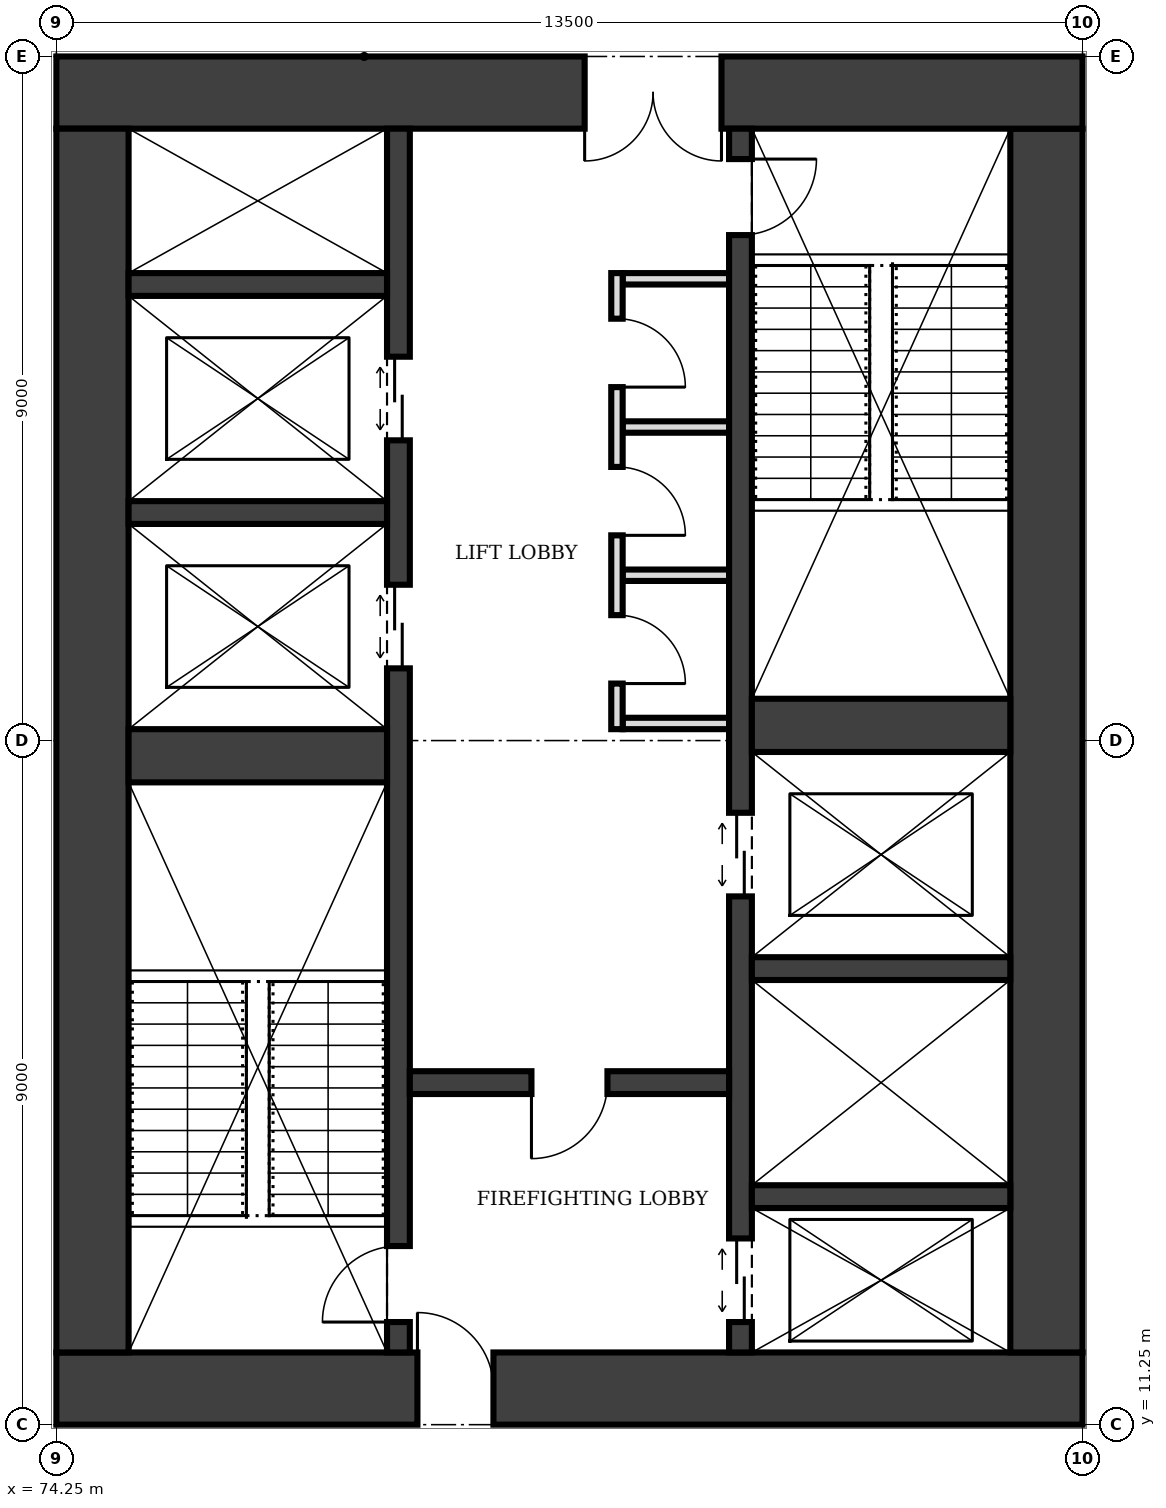
"""IFC4 building model, lengths in metres.
Left out: names, types, materials, properties, quantities, classifications, styles, units other than length and angle.
Written with IfcOpenShell. Run it as: python <this file> out.ifc"""

import sys

from ifc_helpers import new_model, si_unit, direction, frame, frame_2d, origin, place, context, subcontext, project, spatial, rectangle, extrude, element, fill, save


model = new_model("IFC4")
c1 = context("Model", 3, precision=1e-05, world=origin(), true_north=direction((0.0, 1.0)))
c2 = subcontext(c1, "Body", "Model", "MODEL_VIEW")
j1 = project(units=[si_unit("LENGTHUNIT", "METRE"), si_unit("PLANEANGLEUNIT", "RADIAN")], contexts=[c1])
p1 = place(None, origin())
s1 = spatial("IfcSite", under=j1, at=p1, CompositionType="ELEMENT")
p2 = place(p1, origin())
s2 = spatial("IfcBuilding", under=s1, at=p2, CompositionType="ELEMENT")
p3 = place(p2, frame((0.0, 0.0, 49.0)))
s3 = spatial("IfcBuildingStorey", under=s2, at=p3, CompositionType="ELEMENT", Elevation=49.0)
p4 = place(p3, frame((74.25, 11.725, 0.0), z_axis=(0.0, 0.0, 1.0), x_axis=(1.0, 0.0, 0.0)))
e1 = element("IfcWall", 1, at=p4, inside=s3, PredefinedType="SHEAR", context=c2, shape_type="SweptSolid", body=[
    extrude(rectangle(XDim=13.5, YDim=0.95, at=frame_2d((6.75, 0.0))), origin(), (0.0, 0.0, 1.0), 4.0),
])
p5 = place(p4, frame((4.75, 0.0, 0.0)))
e2 = element("IfcOpeningElement", 2, at=p5, cuts=e1, PredefinedType="OPENING", context=c2, shape_type="SweptSolid", body=[
    extrude(rectangle(XDim=1.0, YDim=2.1, at=frame_2d((0.5, 1.05))), frame((0.0, 0.485, 0.0), z_axis=(0.0, -1.0, 0.0), x_axis=(1.0, 0.0, 0.0)), (0.0, 0.0, 1.0), 0.97),
])
p6 = place(p3, frame((87.275, 12.2, 0.0), z_axis=(0.0, 0.0, 1.0), x_axis=(0.0, 1.0, 0.0)))
e3 = element("IfcWall", 3, at=p6, inside=s3, PredefinedType="SHEAR", context=c2, shape_type="SweptSolid", body=[
    extrude(rectangle(XDim=16.1, YDim=0.95, at=frame_2d((8.05, 0.0))), origin(), (0.0, 0.0, 1.0), 4.0),
])
p7 = place(p3, frame((87.75, 28.775, 0.0), z_axis=(0.0, 0.0, 1.0), x_axis=(-1.0, 0.0, 0.0)))
e4 = element("IfcWall", 4, at=p7, inside=s3, PredefinedType="SHEAR", context=c2, shape_type="SweptSolid", body=[
    extrude(rectangle(XDim=13.5, YDim=0.95, at=frame_2d((6.75, 0.0))), origin(), (0.0, 0.0, 1.0), 4.0),
])
p8 = place(p7, frame((4.75, 0.0, 0.0)))
e5 = element("IfcOpeningElement", 5, at=p8, cuts=e4, PredefinedType="OPENING", context=c2, shape_type="SweptSolid", body=[
    extrude(rectangle(XDim=1.8, YDim=2.1, at=frame_2d((0.9, 1.05))), frame((0.0, 0.485, 0.0), z_axis=(0.0, -1.0, 0.0), x_axis=(1.0, 0.0, 0.0)), (0.0, 0.0, 1.0), 0.97),
])
p9 = place(p3, frame((74.725, 28.3, 0.0), z_axis=(0.0, 0.0, 1.0), x_axis=(0.0, -1.0, 0.0)))
e6 = element("IfcWall", 6, at=p9, inside=s3, PredefinedType="SHEAR", context=c2, shape_type="SweptSolid", body=[
    extrude(rectangle(XDim=16.1, YDim=0.95, at=frame_2d((8.05, 0.0))), origin(), (0.0, 0.0, 1.0), 4.0),
])
p10 = place(p3, frame((78.75, 12.2, 0.0), z_axis=(0.0, 0.0, 1.0), x_axis=(0.0, 1.0, 0.0)))
e7 = element("IfcWall", 7, at=p10, inside=s3, PredefinedType="SHEAR", context=c2, shape_type="SweptSolid", body=[
    extrude(rectangle(XDim=16.1, YDim=0.3, at=frame_2d((8.05, 0.0))), origin(), (0.0, 0.0, 1.0), 4.0),
])
p11 = place(p10, frame((0.4, 0.0, 0.0)))
e8 = element("IfcOpeningElement", 8, at=p11, cuts=e7, PredefinedType="OPENING", context=c2, shape_type="SweptSolid", body=[
    extrude(rectangle(XDim=1.0, YDim=2.1, at=frame_2d((0.5, 1.05))), frame((0.0, 0.16, 0.0), z_axis=(0.0, -1.0, 0.0), x_axis=(1.0, 0.0, 0.0)), (0.0, 0.0, 1.0), 0.32),
])
p12 = place(p10, frame((9.0, 0.0, 0.0)))
e9 = element("IfcOpeningElement", 9, at=p12, cuts=e7, PredefinedType="OPENING", context=c2, shape_type="SweptSolid", body=[
    extrude(rectangle(XDim=1.1, YDim=2.1, at=frame_2d((0.55, 1.05))), frame((0.0, 0.16, 0.0), z_axis=(0.0, -1.0, 0.0), x_axis=(1.0, 0.0, 0.0)), (0.0, 0.0, 1.0), 0.32),
])
p13 = place(p10, frame((12.0, 0.0, 0.0)))
e10 = element("IfcOpeningElement", 10, at=p13, cuts=e7, PredefinedType="OPENING", context=c2, shape_type="SweptSolid", body=[
    extrude(rectangle(XDim=1.1, YDim=2.1, at=frame_2d((0.55, 1.05))), frame((0.0, 0.16, 0.0), z_axis=(0.0, -1.0, 0.0), x_axis=(1.0, 0.0, 0.0)), (0.0, 0.0, 1.0), 0.32),
])
p14 = place(p3, frame((83.25, 12.2, 0.0), z_axis=(0.0, 0.0, 1.0), x_axis=(0.0, 1.0, 0.0)))
e11 = element("IfcWall", 11, at=p14, inside=s3, PredefinedType="SHEAR", context=c2, shape_type="SweptSolid", body=[
    extrude(rectangle(XDim=16.1, YDim=0.3, at=frame_2d((8.05, 0.0))), origin(), (0.0, 0.0, 1.0), 4.0),
])
p15 = place(p14, frame((14.7, 0.0, 0.0)))
e12 = element("IfcOpeningElement", 12, at=p15, cuts=e11, PredefinedType="OPENING", context=c2, shape_type="SweptSolid", body=[
    extrude(rectangle(XDim=1.0, YDim=2.1, at=frame_2d((0.5, 1.05))), frame((0.0, 0.16, 0.0), z_axis=(0.0, -1.0, 0.0), x_axis=(1.0, 0.0, 0.0)), (0.0, 0.0, 1.0), 0.32),
])
p16 = place(p14, frame((0.4, 0.0, 0.0)))
e13 = element("IfcOpeningElement", 13, at=p16, cuts=e11, PredefinedType="OPENING", context=c2, shape_type="SweptSolid", body=[
    extrude(rectangle(XDim=1.1, YDim=2.1, at=frame_2d((0.55, 1.05))), frame((0.0, 0.16, 0.0), z_axis=(0.0, -1.0, 0.0), x_axis=(1.0, 0.0, 0.0)), (0.0, 0.0, 1.0), 0.32),
])
p17 = place(p14, frame((6.0, 0.0, 0.0)))
e14 = element("IfcOpeningElement", 14, at=p17, cuts=e11, PredefinedType="OPENING", context=c2, shape_type="SweptSolid", body=[
    extrude(rectangle(XDim=1.1, YDim=2.1, at=frame_2d((0.55, 1.05))), frame((0.0, 0.16, 0.0), z_axis=(0.0, -1.0, 0.0), x_axis=(1.0, 0.0, 0.0)), (0.0, 0.0, 1.0), 0.32),
])
p18 = place(p3, frame((75.2, 20.05, 0.0), z_axis=(0.0, 0.0, 1.0), x_axis=(1.0, 0.0, 0.0)))
e15 = element("IfcWall", 15, at=p18, inside=s3, PredefinedType="SHEAR", context=c2, shape_type="SweptSolid", body=[
    extrude(rectangle(XDim=3.4, YDim=0.7, at=frame_2d((1.7, 0.0))), origin(), (0.0, 0.0, 1.0), 4.0),
])
p19 = place(p3, frame((78.9, 15.75, 0.0), z_axis=(0.0, 0.0, 1.0), x_axis=(1.0, 0.0, 0.0)))
e16 = element("IfcWall", 16, at=p19, inside=s3, PredefinedType="SHEAR", context=c2, shape_type="SweptSolid", body=[
    extrude(rectangle(XDim=4.2, YDim=0.3, at=frame_2d((2.1, 0.0))), origin(), (0.0, 0.0, 1.0), 4.0),
])
p20 = place(p19, frame((1.6, 0.0, 0.0)))
e17 = element("IfcOpeningElement", 17, at=p20, cuts=e16, PredefinedType="OPENING", context=c2, shape_type="SweptSolid", body=[
    extrude(rectangle(XDim=1.0, YDim=2.1, at=frame_2d((0.5, 1.05))), frame((0.0, 0.16, 0.0), z_axis=(0.0, -1.0, 0.0), x_axis=(1.0, 0.0, 0.0)), (0.0, 0.0, 1.0), 0.32),
])
for number, where, z_axis, x_axis in (
    (18, (83.4, 14.25, 0.0), (0.0, 0.0, 1.0), (1.0, 0.0, 0.0)),
    (19, (83.4, 17.25, 0.0), (0.0, 0.0, 1.0), (1.0, 0.0, 0.0)),
):
    element("IfcWall", number, at=place(p3, frame(where, z_axis=z_axis, x_axis=x_axis)), inside=s3, PredefinedType="SHEAR", context=c2, shape_type="SweptSolid", body=[
        extrude(rectangle(XDim=3.4, YDim=0.3, at=frame_2d((1.7, 0.0))), origin(), (0.0, 0.0, 1.0), 4.0),
    ])
p21 = place(p3, frame((83.4, 20.45, 0.0), z_axis=(0.0, 0.0, 1.0), x_axis=(1.0, 0.0, 0.0)))
e20 = element("IfcWall", 20, at=p21, inside=s3, PredefinedType="SHEAR", context=c2, shape_type="SweptSolid", body=[
    extrude(rectangle(XDim=3.4, YDim=0.7, at=frame_2d((1.7, 0.0))), origin(), (0.0, 0.0, 1.0), 4.0),
])
for number, where, z_axis, x_axis in (
    (21, (75.2, 23.25, 0.0), (0.0, 0.0, 1.0), (1.0, 0.0, 0.0)),
    (22, (75.2, 26.25, 0.0), (0.0, 0.0, 1.0), (1.0, 0.0, 0.0)),
):
    element("IfcWall", number, at=place(p3, frame(where, z_axis=z_axis, x_axis=x_axis)), inside=s3, PredefinedType="SHEAR", context=c2, shape_type="SweptSolid", body=[
        extrude(rectangle(XDim=3.4, YDim=0.3, at=frame_2d((1.7, 0.0))), origin(), (0.0, 0.0, 1.0), 4.0),
    ])
p22 = place(p3, frame((81.625, 20.4, 0.0), z_axis=(0.0, 0.0, 1.0), x_axis=(0.0, 1.0, 0.0)))
e23 = element("IfcWall", 23, at=p22, inside=s3, PredefinedType="PARTITIONING", context=c2, shape_type="SweptSolid", body=[
    extrude(rectangle(XDim=6.0, YDim=0.15, at=frame_2d((3.0, 0.0))), origin(), (0.0, 0.0, 1.0), 3.75),
])
p23 = place(p22, frame((0.6, 0.0, 0.0)))
e24 = element("IfcOpeningElement", 24, at=p23, cuts=e23, PredefinedType="OPENING", context=c2, shape_type="SweptSolid", body=[
    extrude(rectangle(XDim=0.9, YDim=2.1, at=frame_2d((0.45, 1.05))), frame((0.0, 0.085, 0.0), z_axis=(0.0, -1.0, 0.0), x_axis=(1.0, 0.0, 0.0)), (0.0, 0.0, 1.0), 0.17),
])
p24 = place(p22, frame((2.55, 0.0, 0.0)))
e25 = element("IfcOpeningElement", 25, at=p24, cuts=e23, PredefinedType="OPENING", context=c2, shape_type="SweptSolid", body=[
    extrude(rectangle(XDim=0.9, YDim=2.1, at=frame_2d((0.45, 1.05))), frame((0.0, 0.085, 0.0), z_axis=(0.0, -1.0, 0.0), x_axis=(1.0, 0.0, 0.0)), (0.0, 0.0, 1.0), 0.17),
])
p25 = place(p22, frame((4.5, 0.0, 0.0)))
e26 = element("IfcOpeningElement", 26, at=p25, cuts=e23, PredefinedType="OPENING", context=c2, shape_type="SweptSolid", body=[
    extrude(rectangle(XDim=0.9, YDim=2.1, at=frame_2d((0.45, 1.05))), frame((0.0, 0.085, 0.0), z_axis=(0.0, -1.0, 0.0), x_axis=(1.0, 0.0, 0.0)), (0.0, 0.0, 1.0), 0.17),
])
for number, where, z_axis, x_axis in (
    (27, (81.7, 20.475, 0.0), (0.0, 0.0, 1.0), (1.0, 0.0, 0.0)),
    (28, (81.7, 22.425, 0.0), (0.0, 0.0, 1.0), (1.0, 0.0, 0.0)),
    (29, (81.7, 24.375, 0.0), (0.0, 0.0, 1.0), (1.0, 0.0, 0.0)),
    (30, (81.7, 26.325, 0.0), (0.0, 0.0, 1.0), (1.0, 0.0, 0.0)),
):
    element("IfcWall", number, at=place(p3, frame(where, z_axis=z_axis, x_axis=x_axis)), inside=s3, PredefinedType="PARTITIONING", context=c2, shape_type="SweptSolid", body=[
        extrude(rectangle(XDim=1.4, YDim=0.15, at=frame_2d((0.7, 0.0))), origin(), (0.0, 0.0, 1.0), 3.75),
    ])
p26 = place(p5, origin())
e31 = element("IfcDoor", 31, at=p26, inside=s3, OperationType="SINGLE_SWING_LEFT", PredefinedType="DOOR", context=c2, shape_type="SweptSolid", body=[
    extrude(rectangle(XDim=1.0, YDim=2.1, at=frame_2d((0.5, 1.05))), frame((0.0, 0.025, 0.0), z_axis=(0.0, -1.0, 0.0), x_axis=(1.0, 0.0, 0.0)), (0.0, 0.0, 1.0), 0.05),
])
fill(e2, e31)
p27 = place(p8, origin())
e32 = element("IfcDoor", 32, at=p27, inside=s3, OperationType="DOUBLE_DOOR_SINGLE_SWING", PredefinedType="DOOR", context=c2, shape_type="SweptSolid", body=[
    extrude(rectangle(XDim=1.8, YDim=2.1, at=frame_2d((0.9, 1.05))), frame((0.0, 0.025, 0.0), z_axis=(0.0, -1.0, 0.0), x_axis=(1.0, 0.0, 0.0)), (0.0, 0.0, 1.0), 0.05),
])
fill(e5, e32)
p28 = place(p20, frame((1.0, 0.0, 0.0), z_axis=(0.0, 0.0, 1.0), x_axis=(-1.0, 0.0, 0.0)))
e33 = element("IfcDoor", 33, at=p28, inside=s3, OperationType="SINGLE_SWING_RIGHT", PredefinedType="DOOR", context=c2, shape_type="SweptSolid", body=[
    extrude(rectangle(XDim=1.0, YDim=2.1, at=frame_2d((0.5, 1.05))), frame((0.0, 0.025, 0.0), z_axis=(0.0, -1.0, 0.0), x_axis=(1.0, 0.0, 0.0)), (0.0, 0.0, 1.0), 0.05),
])
fill(e17, e33)
p29 = place(p11, origin())
e34 = element("IfcDoor", 34, at=p29, inside=s3, OperationType="SINGLE_SWING_LEFT", PredefinedType="DOOR", context=c2, shape_type="SweptSolid", body=[
    extrude(rectangle(XDim=1.0, YDim=2.1, at=frame_2d((0.5, 1.05))), frame((0.0, 0.025, 0.0), z_axis=(0.0, -1.0, 0.0), x_axis=(1.0, 0.0, 0.0)), (0.0, 0.0, 1.0), 0.05),
])
fill(e8, e34)
p30 = place(p15, frame((1.0, 0.0, 0.0), z_axis=(0.0, 0.0, 1.0), x_axis=(-1.0, 0.0, 0.0)))
e35 = element("IfcDoor", 35, at=p30, inside=s3, OperationType="SINGLE_SWING_LEFT", PredefinedType="DOOR", context=c2, shape_type="SweptSolid", body=[
    extrude(rectangle(XDim=1.0, YDim=2.1, at=frame_2d((0.5, 1.05))), frame((0.0, 0.025, 0.0), z_axis=(0.0, -1.0, 0.0), x_axis=(1.0, 0.0, 0.0)), (0.0, 0.0, 1.0), 0.05),
])
fill(e12, e35)
p31 = place(p16, origin())
e36 = element("IfcDoor", 36, at=p31, inside=s3, OperationType="DOUBLE_DOOR_SLIDING", PredefinedType="DOOR", context=c2, shape_type="SweptSolid", body=[
    extrude(rectangle(XDim=1.1, YDim=2.1, at=frame_2d((0.55, 1.05))), frame((0.0, 0.025, 0.0), z_axis=(0.0, -1.0, 0.0), x_axis=(1.0, 0.0, 0.0)), (0.0, 0.0, 1.0), 0.05),
])
fill(e13, e36)
p32 = place(p12, origin())
e37 = element("IfcDoor", 37, at=p32, inside=s3, OperationType="DOUBLE_DOOR_SLIDING", PredefinedType="DOOR", context=c2, shape_type="SweptSolid", body=[
    extrude(rectangle(XDim=1.1, YDim=2.1, at=frame_2d((0.55, 1.05))), frame((0.0, 0.025, 0.0), z_axis=(0.0, -1.0, 0.0), x_axis=(1.0, 0.0, 0.0)), (0.0, 0.0, 1.0), 0.05),
])
fill(e9, e37)
p33 = place(p13, origin())
e38 = element("IfcDoor", 38, at=p33, inside=s3, OperationType="DOUBLE_DOOR_SLIDING", PredefinedType="DOOR", context=c2, shape_type="SweptSolid", body=[
    extrude(rectangle(XDim=1.1, YDim=2.1, at=frame_2d((0.55, 1.05))), frame((0.0, 0.025, 0.0), z_axis=(0.0, -1.0, 0.0), x_axis=(1.0, 0.0, 0.0)), (0.0, 0.0, 1.0), 0.05),
])
fill(e10, e38)
p34 = place(p17, origin())
e39 = element("IfcDoor", 39, at=p34, inside=s3, OperationType="DOUBLE_DOOR_SLIDING", PredefinedType="DOOR", context=c2, shape_type="SweptSolid", body=[
    extrude(rectangle(XDim=1.1, YDim=2.1, at=frame_2d((0.55, 1.05))), frame((0.0, 0.025, 0.0), z_axis=(0.0, -1.0, 0.0), x_axis=(1.0, 0.0, 0.0)), (0.0, 0.0, 1.0), 0.05),
])
fill(e14, e39)
p35 = place(p23, frame((0.9, 0.0, 0.0), z_axis=(0.0, 0.0, 1.0), x_axis=(-1.0, 0.0, 0.0)))
e40 = element("IfcDoor", 40, at=p35, inside=s3, OperationType="SINGLE_SWING_RIGHT", PredefinedType="DOOR", context=c2, shape_type="SweptSolid", body=[
    extrude(rectangle(XDim=0.9, YDim=2.1, at=frame_2d((0.45, 1.05))), frame((0.0, 0.025, 0.0), z_axis=(0.0, -1.0, 0.0), x_axis=(1.0, 0.0, 0.0)), (0.0, 0.0, 1.0), 0.05),
])
fill(e24, e40)
p36 = place(p24, frame((0.9, 0.0, 0.0), z_axis=(0.0, 0.0, 1.0), x_axis=(-1.0, 0.0, 0.0)))
e41 = element("IfcDoor", 41, at=p36, inside=s3, OperationType="SINGLE_SWING_RIGHT", PredefinedType="DOOR", context=c2, shape_type="SweptSolid", body=[
    extrude(rectangle(XDim=0.9, YDim=2.1, at=frame_2d((0.45, 1.05))), frame((0.0, 0.025, 0.0), z_axis=(0.0, -1.0, 0.0), x_axis=(1.0, 0.0, 0.0)), (0.0, 0.0, 1.0), 0.05),
])
fill(e25, e41)
p37 = place(p25, frame((0.9, 0.0, 0.0), z_axis=(0.0, 0.0, 1.0), x_axis=(-1.0, 0.0, 0.0)))
e42 = element("IfcDoor", 42, at=p37, inside=s3, OperationType="SINGLE_SWING_RIGHT", PredefinedType="DOOR", context=c2, shape_type="SweptSolid", body=[
    extrude(rectangle(XDim=0.9, YDim=2.1, at=frame_2d((0.45, 1.05))), frame((0.0, 0.025, 0.0), z_axis=(0.0, -1.0, 0.0), x_axis=(1.0, 0.0, 0.0)), (0.0, 0.0, 1.0), 0.05),
])
fill(e26, e42)
save(model, sys.argv[1])
